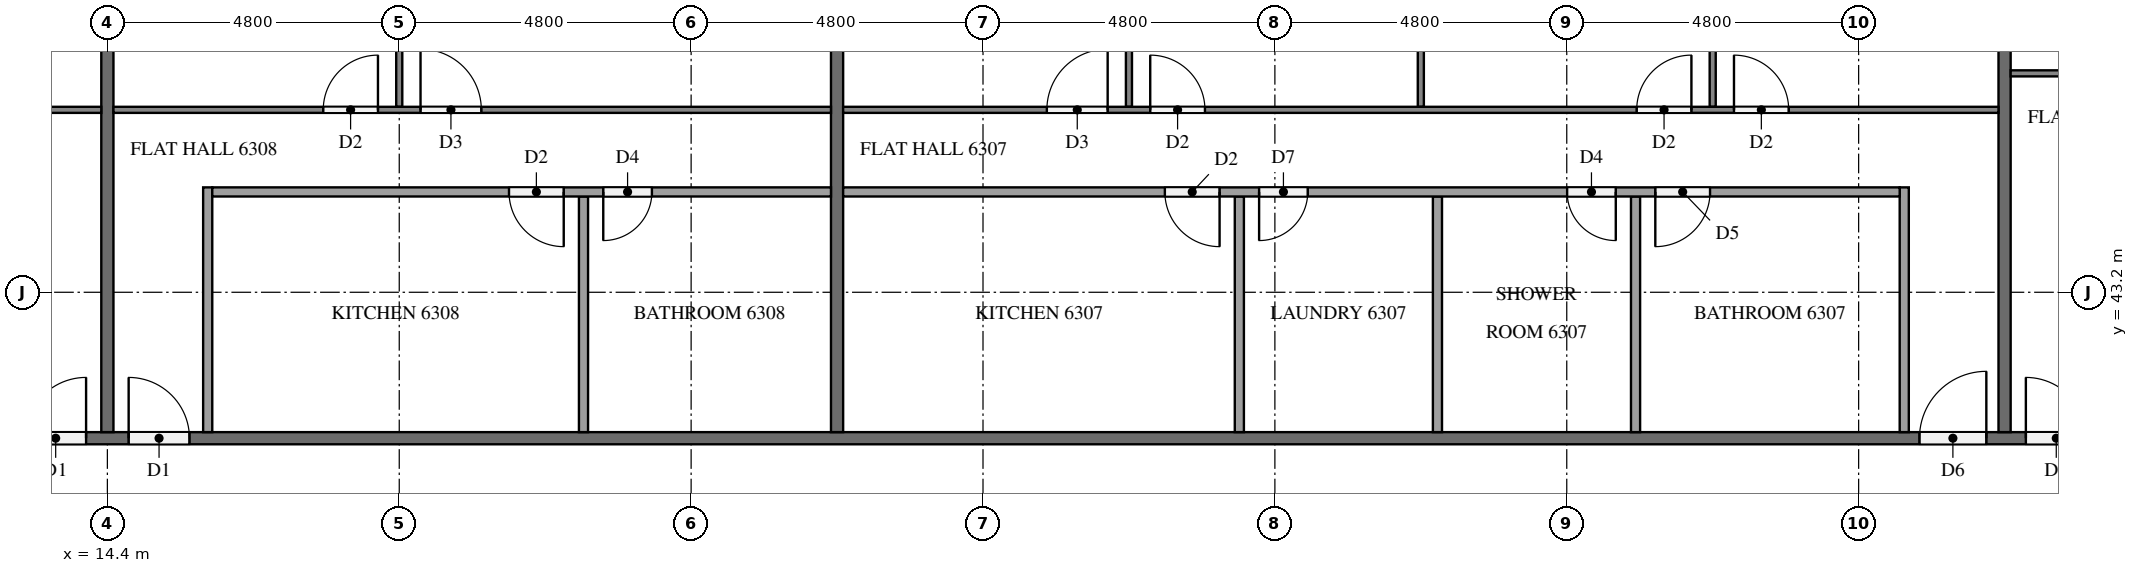
"""IFC4 building model, lengths in metres.
Left out: names, types, materials, properties, quantities, classifications, styles, units other than length and angle.
Written with IfcOpenShell. Run it as: python <this file> out.ifc"""

import sys

from ifc_helpers import new_model, si_unit, direction, frame, frame_2d, origin, place, context, subcontext, project, spatial, rectangle, extrude, element, fill, save


model = new_model("IFC4")
c1 = context("Model", 3, precision=1e-05, world=origin(), true_north=direction((0.0, 1.0)))
c2 = subcontext(c1, "Body", "Model", "MODEL_VIEW")
j1 = project(units=[si_unit("LENGTHUNIT", "METRE"), si_unit("PLANEANGLEUNIT", "RADIAN")], contexts=[c1])
p1 = place(None, origin())
s1 = spatial("IfcSite", under=j1, at=p1, CompositionType="ELEMENT")
p2 = place(p1, origin())
s2 = spatial("IfcBuilding", under=s1, at=p2, CompositionType="ELEMENT")
p3 = place(p2, frame((0.0, 0.0, 242.2)))
s3 = spatial("IfcBuildingStorey", under=s2, at=p3, CompositionType="ELEMENT", Elevation=242.2)
p4 = place(p3, frame((11.9, 40.8, 0.0), z_axis=(0.0, 0.0, 1.0), x_axis=(1.0, 0.0, 0.0)))
e1 = element("IfcWall", 1, at=p4, inside=s3, PredefinedType="PARTITIONING", context=c2, shape_type="SweptSolid", body=[
    extrude(rectangle(XDim=38.6, YDim=0.2, at=frame_2d((19.3, 0.0))), origin(), (0.0, 0.0, 1.0), 3.2),
])
p5 = place(p4, frame((34.05, 0.0, 0.0)))
e2 = element("IfcOpeningElement", 2, at=p5, cuts=e1, PredefinedType="OPENING", context=c2, shape_type="SweptSolid", body=[
    extrude(rectangle(XDim=1.0, YDim=2.1, at=frame_2d((0.5, 1.05))), frame((0.0, 0.11, 0.0), z_axis=(0.0, -1.0, 0.0), x_axis=(1.0, 0.0, 0.0)), (0.0, 0.0, 1.0), 0.22),
])
p6 = place(p4, frame((32.3, 0.0, 0.0)))
e3 = element("IfcOpeningElement", 3, at=p6, cuts=e1, PredefinedType="OPENING", context=c2, shape_type="SweptSolid", body=[
    extrude(rectangle(XDim=1.1, YDim=2.1, at=frame_2d((0.55, 1.05))), frame((0.0, 0.11, 0.0), z_axis=(0.0, -1.0, 0.0), x_axis=(1.0, 0.0, 0.0)), (0.0, 0.0, 1.0), 0.22),
])
p7 = place(p4, frame((2.85, 0.0, 0.0)))
e4 = element("IfcOpeningElement", 4, at=p7, cuts=e1, PredefinedType="OPENING", context=c2, shape_type="SweptSolid", body=[
    extrude(rectangle(XDim=1.0, YDim=2.1, at=frame_2d((0.5, 1.05))), frame((0.0, 0.11, 0.0), z_axis=(0.0, -1.0, 0.0), x_axis=(1.0, 0.0, 0.0)), (0.0, 0.0, 1.0), 0.22),
])
p8 = place(p4, frame((1.15, 0.0, 0.0)))
e5 = element("IfcOpeningElement", 5, at=p8, cuts=e1, PredefinedType="OPENING", context=c2, shape_type="SweptSolid", body=[
    extrude(rectangle(XDim=1.0, YDim=2.1, at=frame_2d((0.5, 1.05))), frame((0.0, 0.11, 0.0), z_axis=(0.0, -1.0, 0.0), x_axis=(1.0, 0.0, 0.0)), (0.0, 0.0, 1.0), 0.22),
])
for number, where, z_axis, x_axis in (
    (6, (45.6, 52.7, 0.0), (0.0, 0.0, 1.0), (0.0, -1.0, 0.0)),
    (7, (26.4, 52.7, 0.0), (0.0, 0.0, 1.0), (0.0, -1.0, 0.0)),
):
    element("IfcWall", number, at=place(p3, frame(where, z_axis=z_axis, x_axis=x_axis)), inside=s3, PredefinedType="PARTITIONING", context=c2, shape_type="SweptSolid", body=[
        extrude(rectangle(XDim=11.8, YDim=0.2, at=frame_2d((5.9, 0.0))), origin(), (0.0, 0.0, 1.0), 3.2),
    ])
p9 = place(p3, frame((14.4, 52.525, 0.0), z_axis=(0.0, 0.0, 1.0), x_axis=(0.0, -1.0, 0.0)))
e8 = element("IfcWall", 8, at=p9, inside=s3, PredefinedType="PARTITIONING", context=c2, shape_type="SweptSolid", body=[
    extrude(rectangle(XDim=11.625, YDim=0.2, at=frame_2d((5.812, 0.0))), origin(), (0.0, 0.0, 1.0), 3.2),
])
p10 = place(p3, frame((45.7, 46.8, 0.0), z_axis=(0.0, 0.0, 1.0), x_axis=(1.0, 0.0, 0.0)))
e9 = element("IfcWall", 9, at=p10, inside=s3, PredefinedType="PARTITIONING", context=c2, shape_type="SweptSolid", body=[
    extrude(rectangle(XDim=11.8, YDim=0.1, at=frame_2d((5.9, 0.0))), origin(), (0.0, 0.0, 1.0), 3.2),
])
p11 = place(p10, frame((3.45, 0.0, 0.0)))
e10 = element("IfcOpeningElement", 10, at=p11, cuts=e9, PredefinedType="OPENING", context=c2, shape_type="SweptSolid", body=[
    extrude(rectangle(XDim=0.9, YDim=2.1, at=frame_2d((0.45, 1.05))), frame((0.0, 0.06, 0.0), z_axis=(0.0, -1.0, 0.0), x_axis=(1.0, 0.0, 0.0)), (0.0, 0.0, 1.0), 0.12),
])
p12 = place(p10, frame((5.05, 0.0, 0.0)))
e11 = element("IfcOpeningElement", 11, at=p12, cuts=e9, PredefinedType="OPENING", context=c2, shape_type="SweptSolid", body=[
    extrude(rectangle(XDim=1.0, YDim=2.1, at=frame_2d((0.5, 1.05))), frame((0.0, 0.06, 0.0), z_axis=(0.0, -1.0, 0.0), x_axis=(1.0, 0.0, 0.0)), (0.0, 0.0, 1.0), 0.12),
])
for number, where, z_axis, x_axis in (
    (12, (40.8, 46.25, 0.0), (0.0, 0.0, 1.0), (0.0, 1.0, 0.0)),
    (13, (36.0, 46.25, 0.0), (0.0, 0.0, 1.0), (0.0, 1.0, 0.0)),
    (14, (31.2, 46.25, 0.0), (0.0, 0.0, 1.0), (0.0, 1.0, 0.0)),
):
    element("IfcWall", number, at=place(p3, frame(where, z_axis=z_axis, x_axis=x_axis)), inside=s3, PredefinedType="PARTITIONING", context=c2, shape_type="SweptSolid", body=[
        extrude(rectangle(XDim=6.45, YDim=0.1, at=frame_2d((3.225, 0.0))), origin(), (0.0, 0.0, 1.0), 3.2),
    ])
p13 = place(p3, frame((26.5, 46.2, 0.0), z_axis=(0.0, 0.0, 1.0), x_axis=(1.0, 0.0, 0.0)))
e15 = element("IfcWall", 15, at=p13, inside=s3, PredefinedType="PARTITIONING", context=c2, shape_type="SweptSolid", body=[
    extrude(rectangle(XDim=19.0, YDim=0.1, at=frame_2d((9.5, 0.0))), origin(), (0.0, 0.0, 1.0), 3.2),
])
p14 = place(p13, frame((14.65, 0.0, 0.0)))
e16 = element("IfcOpeningElement", 16, at=p14, cuts=e15, PredefinedType="OPENING", context=c2, shape_type="SweptSolid", body=[
    extrude(rectangle(XDim=0.9, YDim=2.1, at=frame_2d((0.45, 1.05))), frame((0.0, 0.06, 0.0), z_axis=(0.0, -1.0, 0.0), x_axis=(1.0, 0.0, 0.0)), (0.0, 0.0, 1.0), 0.12),
])
p15 = place(p13, frame((13.05, 0.0, 0.0)))
e17 = element("IfcOpeningElement", 17, at=p15, cuts=e15, PredefinedType="OPENING", context=c2, shape_type="SweptSolid", body=[
    extrude(rectangle(XDim=0.9, YDim=2.1, at=frame_2d((0.45, 1.05))), frame((0.0, 0.06, 0.0), z_axis=(0.0, -1.0, 0.0), x_axis=(1.0, 0.0, 0.0)), (0.0, 0.0, 1.0), 0.12),
])
p16 = place(p13, frame((5.05, 0.0, 0.0)))
e18 = element("IfcOpeningElement", 18, at=p16, cuts=e15, PredefinedType="OPENING", context=c2, shape_type="SweptSolid", body=[
    extrude(rectangle(XDim=0.9, YDim=2.1, at=frame_2d((0.45, 1.05))), frame((0.0, 0.06, 0.0), z_axis=(0.0, -1.0, 0.0), x_axis=(1.0, 0.0, 0.0)), (0.0, 0.0, 1.0), 0.12),
])
p17 = place(p13, frame((3.35, 0.0, 0.0)))
e19 = element("IfcOpeningElement", 19, at=p17, cuts=e15, PredefinedType="OPENING", context=c2, shape_type="SweptSolid", body=[
    extrude(rectangle(XDim=1.0, YDim=2.1, at=frame_2d((0.5, 1.05))), frame((0.0, 0.06, 0.0), z_axis=(0.0, -1.0, 0.0), x_axis=(1.0, 0.0, 0.0)), (0.0, 0.0, 1.0), 0.12),
])
for number, where, z_axis, x_axis in (
    (20, (39.531, 40.9, 0.0), (0.0, 0.0, 1.0), (0.0, 1.0, 0.0)),
    (21, (36.273, 40.9, 0.0), (0.0, 0.0, 1.0), (0.0, 1.0, 0.0)),
    (22, (33.016, 40.9, 0.0), (0.0, 0.0, 1.0), (0.0, 1.0, 0.0)),
):
    element("IfcWall", number, at=place(p3, frame(where, z_axis=z_axis, x_axis=x_axis)), inside=s3, PredefinedType="PARTITIONING", context=c2, shape_type="SweptSolid", body=[
        extrude(rectangle(XDim=3.875, YDim=0.15, at=frame_2d((1.938, 0.0))), origin(), (0.0, 0.0, 1.0), 3.2),
    ])
p18 = place(p3, frame((43.95, 40.9, 0.0), z_axis=(0.0, 0.0, 1.0), x_axis=(0.0, 1.0, 0.0)))
e23 = element("IfcWall", 23, at=p18, inside=s3, PredefinedType="PARTITIONING", context=c2, shape_type="SweptSolid", body=[
    extrude(rectangle(XDim=4.025, YDim=0.15, at=frame_2d((2.013, 0.0))), origin(), (0.0, 0.0, 1.0), 3.2),
])
p19 = place(p3, frame((43.875, 44.85, 0.0), z_axis=(0.0, 0.0, 1.0), x_axis=(-1.0, 0.0, 0.0)))
e24 = element("IfcWall", 24, at=p19, inside=s3, PredefinedType="PARTITIONING", context=c2, shape_type="SweptSolid", body=[
    extrude(rectangle(XDim=17.375, YDim=0.15, at=frame_2d((8.688, 0.0))), origin(), (0.0, 0.0, 1.0), 3.2),
])
p20 = place(p19, frame((3.119, 0.0, 0.0)))
e25 = element("IfcOpeningElement", 25, at=p20, cuts=e24, PredefinedType="OPENING", context=c2, shape_type="SweptSolid", body=[
    extrude(rectangle(XDim=0.9, YDim=2.1, at=frame_2d((0.45, 1.05))), frame((0.0, 0.085, 0.0), z_axis=(0.0, -1.0, 0.0), x_axis=(1.0, 0.0, 0.0)), (0.0, 0.0, 1.0), 0.17),
])
p21 = place(p19, frame((4.669, 0.0, 0.0)))
e26 = element("IfcOpeningElement", 26, at=p21, cuts=e24, PredefinedType="OPENING", context=c2, shape_type="SweptSolid", body=[
    extrude(rectangle(XDim=0.8, YDim=2.1, at=frame_2d((0.4, 1.05))), frame((0.0, 0.085, 0.0), z_axis=(0.0, -1.0, 0.0), x_axis=(1.0, 0.0, 0.0)), (0.0, 0.0, 1.0), 0.17),
])
p22 = place(p19, frame((9.734, 0.0, 0.0)))
e27 = element("IfcOpeningElement", 27, at=p22, cuts=e24, PredefinedType="OPENING", context=c2, shape_type="SweptSolid", body=[
    extrude(rectangle(XDim=0.8, YDim=2.1, at=frame_2d((0.4, 1.05))), frame((0.0, 0.085, 0.0), z_axis=(0.0, -1.0, 0.0), x_axis=(1.0, 0.0, 0.0)), (0.0, 0.0, 1.0), 0.17),
])
p23 = place(p19, frame((11.184, 0.0, 0.0)))
e28 = element("IfcOpeningElement", 28, at=p23, cuts=e24, PredefinedType="OPENING", context=c2, shape_type="SweptSolid", body=[
    extrude(rectangle(XDim=0.9, YDim=2.1, at=frame_2d((0.45, 1.05))), frame((0.0, 0.085, 0.0), z_axis=(0.0, -1.0, 0.0), x_axis=(1.0, 0.0, 0.0)), (0.0, 0.0, 1.0), 0.17),
])
p24 = place(p3, frame((19.2, 46.25, 0.0), z_axis=(0.0, 0.0, 1.0), x_axis=(0.0, 1.0, 0.0)))
e29 = element("IfcWall", 29, at=p24, inside=s3, PredefinedType="PARTITIONING", context=c2, shape_type="SweptSolid", body=[
    extrude(rectangle(XDim=6.45, YDim=0.1, at=frame_2d((3.225, 0.0))), origin(), (0.0, 0.0, 1.0), 3.2),
])
p25 = place(p3, frame((14.5, 46.2, 0.0), z_axis=(0.0, 0.0, 1.0), x_axis=(1.0, 0.0, 0.0)))
e30 = element("IfcWall", 30, at=p25, inside=s3, PredefinedType="PARTITIONING", context=c2, shape_type="SweptSolid", body=[
    extrude(rectangle(XDim=11.8, YDim=0.1, at=frame_2d((5.9, 0.0))), origin(), (0.0, 0.0, 1.0), 3.2),
])
p26 = place(p25, frame((3.45, 0.0, 0.0)))
e31 = element("IfcOpeningElement", 31, at=p26, cuts=e30, PredefinedType="OPENING", context=c2, shape_type="SweptSolid", body=[
    extrude(rectangle(XDim=0.9, YDim=2.1, at=frame_2d((0.45, 1.05))), frame((0.0, 0.06, 0.0), z_axis=(0.0, -1.0, 0.0), x_axis=(1.0, 0.0, 0.0)), (0.0, 0.0, 1.0), 0.12),
])
p27 = place(p25, frame((5.05, 0.0, 0.0)))
e32 = element("IfcOpeningElement", 32, at=p27, cuts=e30, PredefinedType="OPENING", context=c2, shape_type="SweptSolid", body=[
    extrude(rectangle(XDim=1.0, YDim=2.1, at=frame_2d((0.5, 1.05))), frame((0.0, 0.06, 0.0), z_axis=(0.0, -1.0, 0.0), x_axis=(1.0, 0.0, 0.0)), (0.0, 0.0, 1.0), 0.12),
])
p28 = place(p3, frame((22.23, 40.9, 0.0), z_axis=(0.0, 0.0, 1.0), x_axis=(0.0, 1.0, 0.0)))
e33 = element("IfcWall", 33, at=p28, inside=s3, PredefinedType="PARTITIONING", context=c2, shape_type="SweptSolid", body=[
    extrude(rectangle(XDim=3.875, YDim=0.15, at=frame_2d((1.938, 0.0))), origin(), (0.0, 0.0, 1.0), 3.2),
])
p29 = place(p3, frame((16.05, 40.9, 0.0), z_axis=(0.0, 0.0, 1.0), x_axis=(0.0, 1.0, 0.0)))
e34 = element("IfcWall", 34, at=p29, inside=s3, PredefinedType="PARTITIONING", context=c2, shape_type="SweptSolid", body=[
    extrude(rectangle(XDim=4.025, YDim=0.15, at=frame_2d((2.013, 0.0))), origin(), (0.0, 0.0, 1.0), 3.2),
])
p30 = place(p3, frame((26.3, 44.85, 0.0), z_axis=(0.0, 0.0, 1.0), x_axis=(-1.0, 0.0, 0.0)))
e35 = element("IfcWall", 35, at=p30, inside=s3, PredefinedType="PARTITIONING", context=c2, shape_type="SweptSolid", body=[
    extrude(rectangle(XDim=10.175, YDim=0.15, at=frame_2d((5.087, 0.0))), origin(), (0.0, 0.0, 1.0), 3.2),
])
p31 = place(p30, frame((4.395, 0.0, 0.0)))
e36 = element("IfcOpeningElement", 36, at=p31, cuts=e35, PredefinedType="OPENING", context=c2, shape_type="SweptSolid", body=[
    extrude(rectangle(XDim=0.9, YDim=2.1, at=frame_2d((0.45, 1.05))), frame((0.0, 0.085, 0.0), z_axis=(0.0, -1.0, 0.0), x_axis=(1.0, 0.0, 0.0)), (0.0, 0.0, 1.0), 0.17),
])
p32 = place(p30, frame((2.945, 0.0, 0.0)))
e37 = element("IfcOpeningElement", 37, at=p32, cuts=e35, PredefinedType="OPENING", context=c2, shape_type="SweptSolid", body=[
    extrude(rectangle(XDim=0.8, YDim=2.1, at=frame_2d((0.4, 1.05))), frame((0.0, 0.085, 0.0), z_axis=(0.0, -1.0, 0.0), x_axis=(1.0, 0.0, 0.0)), (0.0, 0.0, 1.0), 0.17),
])
p33 = place(p3, frame((0.1, 46.2, 0.0), z_axis=(0.0, 0.0, 1.0), x_axis=(1.0, 0.0, 0.0)))
e38 = element("IfcWall", 38, at=p33, inside=s3, PredefinedType="PARTITIONING", context=c2, shape_type="SweptSolid", body=[
    extrude(rectangle(XDim=14.2, YDim=0.1, at=frame_2d((7.1, 0.0))), origin(), (0.0, 0.0, 1.0), 3.2),
])
p34 = place(p33, frame((9.85, 0.0, 0.0)))
e39 = element("IfcOpeningElement", 39, at=p34, cuts=e38, PredefinedType="OPENING", context=c2, shape_type="SweptSolid", body=[
    extrude(rectangle(XDim=1.0, YDim=2.1, at=frame_2d((0.5, 1.05))), frame((0.0, 0.06, 0.0), z_axis=(0.0, -1.0, 0.0), x_axis=(1.0, 0.0, 0.0)), (0.0, 0.0, 1.0), 0.12),
])
p35 = place(p33, frame((8.25, 0.0, 0.0)))
e40 = element("IfcOpeningElement", 40, at=p35, cuts=e38, PredefinedType="OPENING", context=c2, shape_type="SweptSolid", body=[
    extrude(rectangle(XDim=0.9, YDim=2.1, at=frame_2d((0.45, 1.05))), frame((0.0, 0.06, 0.0), z_axis=(0.0, -1.0, 0.0), x_axis=(1.0, 0.0, 0.0)), (0.0, 0.0, 1.0), 0.12),
])
p36 = place(p33, frame((0.3, 0.0, 0.0)))
e41 = element("IfcOpeningElement", 41, at=p36, cuts=e38, PredefinedType="OPENING", context=c2, shape_type="SweptSolid", body=[
    extrude(rectangle(XDim=0.9, YDim=2.1, at=frame_2d((0.45, 1.05))), frame((0.0, 0.06, 0.0), z_axis=(0.0, -1.0, 0.0), x_axis=(1.0, 0.0, 0.0)), (0.0, 0.0, 1.0), 0.12),
])
p37 = place(p5, origin())
e42 = element("IfcDoor", 42, at=p37, inside=s3, OperationType="SINGLE_SWING_LEFT", PredefinedType="DOOR", context=c2, shape_type="SweptSolid", body=[
    extrude(rectangle(XDim=1.0, YDim=2.1, at=frame_2d((0.5, 1.05))), frame((0.0, 0.025, 0.0), z_axis=(0.0, -1.0, 0.0), x_axis=(1.0, 0.0, 0.0)), (0.0, 0.0, 1.0), 0.05),
])
fill(e2, e42)
p38 = place(p6, origin())
e43 = element("IfcDoor", 43, at=p38, inside=s3, OperationType="SINGLE_SWING_RIGHT", PredefinedType="DOOR", context=c2, shape_type="SweptSolid", body=[
    extrude(rectangle(XDim=1.1, YDim=2.1, at=frame_2d((0.55, 1.05))), frame((0.0, 0.025, 0.0), z_axis=(0.0, -1.0, 0.0), x_axis=(1.0, 0.0, 0.0)), (0.0, 0.0, 1.0), 0.05),
])
fill(e3, e43)
p39 = place(p7, origin())
e44 = element("IfcDoor", 44, at=p39, inside=s3, OperationType="SINGLE_SWING_LEFT", PredefinedType="DOOR", context=c2, shape_type="SweptSolid", body=[
    extrude(rectangle(XDim=1.0, YDim=2.1, at=frame_2d((0.5, 1.05))), frame((0.0, 0.025, 0.0), z_axis=(0.0, -1.0, 0.0), x_axis=(1.0, 0.0, 0.0)), (0.0, 0.0, 1.0), 0.05),
])
fill(e4, e44)
p40 = place(p8, origin())
e45 = element("IfcDoor", 45, at=p40, inside=s3, OperationType="SINGLE_SWING_RIGHT", PredefinedType="DOOR", context=c2, shape_type="SweptSolid", body=[
    extrude(rectangle(XDim=1.0, YDim=2.1, at=frame_2d((0.5, 1.05))), frame((0.0, 0.025, 0.0), z_axis=(0.0, -1.0, 0.0), x_axis=(1.0, 0.0, 0.0)), (0.0, 0.0, 1.0), 0.05),
])
fill(e5, e45)
p41 = place(p14, origin())
e46 = element("IfcDoor", 46, at=p41, inside=s3, OperationType="SINGLE_SWING_LEFT", PredefinedType="DOOR", context=c2, shape_type="SweptSolid", body=[
    extrude(rectangle(XDim=0.9, YDim=2.1, at=frame_2d((0.45, 1.05))), frame((0.0, 0.025, 0.0), z_axis=(0.0, -1.0, 0.0), x_axis=(1.0, 0.0, 0.0)), (0.0, 0.0, 1.0), 0.05),
])
fill(e16, e46)
p42 = place(p15, origin())
e47 = element("IfcDoor", 47, at=p42, inside=s3, OperationType="SINGLE_SWING_RIGHT", PredefinedType="DOOR", context=c2, shape_type="SweptSolid", body=[
    extrude(rectangle(XDim=0.9, YDim=2.1, at=frame_2d((0.45, 1.05))), frame((0.0, 0.025, 0.0), z_axis=(0.0, -1.0, 0.0), x_axis=(1.0, 0.0, 0.0)), (0.0, 0.0, 1.0), 0.05),
])
fill(e17, e47)
p43 = place(p16, origin())
e48 = element("IfcDoor", 48, at=p43, inside=s3, OperationType="SINGLE_SWING_LEFT", PredefinedType="DOOR", context=c2, shape_type="SweptSolid", body=[
    extrude(rectangle(XDim=0.9, YDim=2.1, at=frame_2d((0.45, 1.05))), frame((0.0, 0.025, 0.0), z_axis=(0.0, -1.0, 0.0), x_axis=(1.0, 0.0, 0.0)), (0.0, 0.0, 1.0), 0.05),
])
fill(e18, e48)
p44 = place(p17, origin())
e49 = element("IfcDoor", 49, at=p44, inside=s3, OperationType="SINGLE_SWING_RIGHT", PredefinedType="DOOR", context=c2, shape_type="SweptSolid", body=[
    extrude(rectangle(XDim=1.0, YDim=2.1, at=frame_2d((0.5, 1.05))), frame((0.0, 0.025, 0.0), z_axis=(0.0, -1.0, 0.0), x_axis=(1.0, 0.0, 0.0)), (0.0, 0.0, 1.0), 0.05),
])
fill(e19, e49)
p45 = place(p20, origin())
e50 = element("IfcDoor", 50, at=p45, inside=s3, OperationType="SINGLE_SWING_RIGHT", PredefinedType="DOOR", context=c2, shape_type="SweptSolid", body=[
    extrude(rectangle(XDim=0.9, YDim=2.1, at=frame_2d((0.45, 1.05))), frame((0.0, 0.025, 0.0), z_axis=(0.0, -1.0, 0.0), x_axis=(1.0, 0.0, 0.0)), (0.0, 0.0, 1.0), 0.05),
])
fill(e25, e50)
p46 = place(p21, origin())
e51 = element("IfcDoor", 51, at=p46, inside=s3, OperationType="SINGLE_SWING_LEFT", PredefinedType="DOOR", context=c2, shape_type="SweptSolid", body=[
    extrude(rectangle(XDim=0.8, YDim=2.1, at=frame_2d((0.4, 1.05))), frame((0.0, 0.025, 0.0), z_axis=(0.0, -1.0, 0.0), x_axis=(1.0, 0.0, 0.0)), (0.0, 0.0, 1.0), 0.05),
])
fill(e26, e51)
p47 = place(p22, origin())
e52 = element("IfcDoor", 52, at=p47, inside=s3, OperationType="SINGLE_SWING_RIGHT", PredefinedType="DOOR", context=c2, shape_type="SweptSolid", body=[
    extrude(rectangle(XDim=0.8, YDim=2.1, at=frame_2d((0.4, 1.05))), frame((0.0, 0.025, 0.0), z_axis=(0.0, -1.0, 0.0), x_axis=(1.0, 0.0, 0.0)), (0.0, 0.0, 1.0), 0.05),
])
fill(e27, e52)
p48 = place(p23, origin())
e53 = element("IfcDoor", 53, at=p48, inside=s3, OperationType="SINGLE_SWING_LEFT", PredefinedType="DOOR", context=c2, shape_type="SweptSolid", body=[
    extrude(rectangle(XDim=0.9, YDim=2.1, at=frame_2d((0.45, 1.05))), frame((0.0, 0.025, 0.0), z_axis=(0.0, -1.0, 0.0), x_axis=(1.0, 0.0, 0.0)), (0.0, 0.0, 1.0), 0.05),
])
fill(e28, e53)
p49 = place(p26, origin())
e54 = element("IfcDoor", 54, at=p49, inside=s3, OperationType="SINGLE_SWING_RIGHT", PredefinedType="DOOR", context=c2, shape_type="SweptSolid", body=[
    extrude(rectangle(XDim=0.9, YDim=2.1, at=frame_2d((0.45, 1.05))), frame((0.0, 0.025, 0.0), z_axis=(0.0, -1.0, 0.0), x_axis=(1.0, 0.0, 0.0)), (0.0, 0.0, 1.0), 0.05),
])
fill(e31, e54)
p50 = place(p27, origin())
e55 = element("IfcDoor", 55, at=p50, inside=s3, OperationType="SINGLE_SWING_LEFT", PredefinedType="DOOR", context=c2, shape_type="SweptSolid", body=[
    extrude(rectangle(XDim=1.0, YDim=2.1, at=frame_2d((0.5, 1.05))), frame((0.0, 0.025, 0.0), z_axis=(0.0, -1.0, 0.0), x_axis=(1.0, 0.0, 0.0)), (0.0, 0.0, 1.0), 0.05),
])
fill(e32, e55)
p51 = place(p31, origin())
e56 = element("IfcDoor", 56, at=p51, inside=s3, OperationType="SINGLE_SWING_LEFT", PredefinedType="DOOR", context=c2, shape_type="SweptSolid", body=[
    extrude(rectangle(XDim=0.9, YDim=2.1, at=frame_2d((0.45, 1.05))), frame((0.0, 0.025, 0.0), z_axis=(0.0, -1.0, 0.0), x_axis=(1.0, 0.0, 0.0)), (0.0, 0.0, 1.0), 0.05),
])
fill(e36, e56)
p52 = place(p32, origin())
e57 = element("IfcDoor", 57, at=p52, inside=s3, OperationType="SINGLE_SWING_RIGHT", PredefinedType="DOOR", context=c2, shape_type="SweptSolid", body=[
    extrude(rectangle(XDim=0.8, YDim=2.1, at=frame_2d((0.4, 1.05))), frame((0.0, 0.025, 0.0), z_axis=(0.0, -1.0, 0.0), x_axis=(1.0, 0.0, 0.0)), (0.0, 0.0, 1.0), 0.05),
])
fill(e37, e57)
save(model, sys.argv[1])
